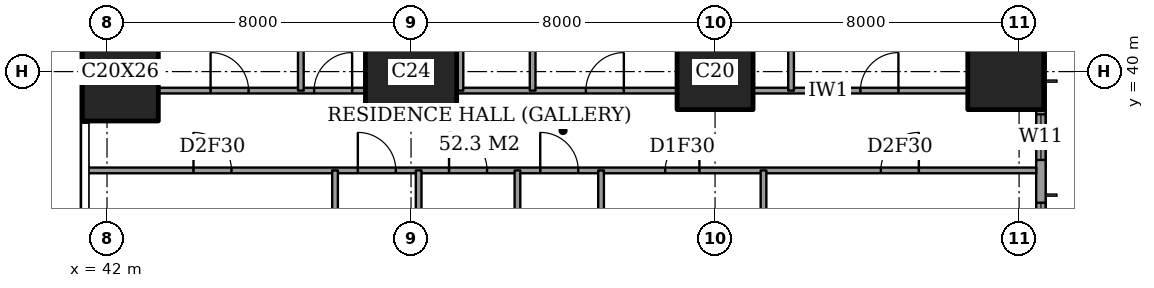
"""IFC4 building model, lengths in metres.
Left out: names, types, materials, properties, quantities, classifications, styles, units other than length and angle.
Written with IfcOpenShell. Run it as: python <this file> out.ifc"""

import sys

from ifc_helpers import new_model, si_unit, direction, frame, frame_2d, origin, origin_2d, place, context, subcontext, project, spatial, rectangle, extrude, element, fill, save


model = new_model("IFC4")
c1 = context("Model", 3, precision=1e-05, world=origin(), true_north=direction((0.0, 1.0)))
c2 = subcontext(c1, "Body", "Model", "MODEL_VIEW")
j1 = project(units=[si_unit("LENGTHUNIT", "METRE"), si_unit("PLANEANGLEUNIT", "RADIAN")], contexts=[c1])
p1 = place(None, origin())
s1 = spatial("IfcSite", under=j1, at=p1, CompositionType="ELEMENT")
p2 = place(p1, origin())
s2 = spatial("IfcBuilding", under=s1, at=p2, CompositionType="ELEMENT")
p3 = place(p2, frame((0.0, 0.0, 117.8)))
s3 = spatial("IfcBuildingStorey", under=s2, at=p3, CompositionType="ELEMENT", Elevation=117.8)
p4 = place(p3, frame((42.35, 40.0, 0.0), z_axis=(0.0, 0.0, 1.0), x_axis=(1.0, 0.0, 0.0)))
e1 = element("IfcColumn", 1, at=p4, inside=s3, PredefinedType="COLUMN", context=c2, shape_type="SweptSolid", body=[
    extrude(rectangle(XDim=2.0, YDim=2.6, at=origin_2d()), origin(), (0.0, 0.0, 1.0), 3.6),
])
p5 = place(p3, frame((50.0, 40.0, 0.0), z_axis=(0.0, 0.0, 1.0), x_axis=(1.0, 0.0, 0.0)))
e2 = element("IfcColumn", 2, at=p5, inside=s3, PredefinedType="COLUMN", context=c2, shape_type="SweptSolid", body=[
    extrude(rectangle(XDim=2.4, YDim=2.4, at=origin_2d()), origin(), (0.0, 0.0, 1.0), 3.6),
])
for number, where, z_axis, x_axis in (
    (3, (58.0, 40.0, 0.0), (0.0, 0.0, 1.0), (1.0, 0.0, 0.0)),
    (4, (65.65, 40.0, 0.0), (0.0, 0.0, 1.0), (1.0, 0.0, 0.0)),
):
    element("IfcColumn", number, at=place(p3, frame(where, z_axis=z_axis, x_axis=x_axis)), inside=s3, PredefinedType="COLUMN", context=c2, shape_type="SweptSolid", body=[
        extrude(rectangle(XDim=2.0, YDim=2.0, at=origin_2d()), origin(), (0.0, 0.0, 1.0), 3.6),
    ])
p6 = place(p3, frame((66.575, 3.175, 0.0), z_axis=(0.0, 0.0, 1.0), x_axis=(0.0, 1.0, 0.0)))
e5 = element("IfcWall", 5, at=p6, inside=s3, PredefinedType="SOLIDWALL", context=c2, shape_type="SweptSolid", body=[
    extrude(rectangle(XDim=41.65, YDim=0.25, at=frame_2d((20.825, 0.0))), origin(), (0.0, 0.0, 1.0), 3.6),
])
p7 = place(p6, frame((0.775, 0.0, 0.4)))
e6 = element("IfcOpeningElement", 6, at=p7, cuts=e5, PredefinedType="OPENING", context=c2, shape_type="SweptSolid", body=[
    extrude(rectangle(XDim=2.4, YDim=2.2, at=frame_2d((1.2, 1.1))), frame((0.0, 0.135, 0.0), z_axis=(0.0, -1.0, 0.0), x_axis=(1.0, 0.0, 0.0)), (0.0, 0.0, 1.0), 0.27),
])
p8 = place(p6, frame((6.4, 0.0, 0.4)))
e7 = element("IfcOpeningElement", 7, at=p8, cuts=e5, PredefinedType="OPENING", context=c2, shape_type="SweptSolid", body=[
    extrude(rectangle(XDim=1.2, YDim=2.2, at=frame_2d((0.6, 1.1))), frame((0.0, 0.135, 0.0), z_axis=(0.0, -1.0, 0.0), x_axis=(1.0, 0.0, 0.0)), (0.0, 0.0, 1.0), 0.27),
])
p9 = place(p6, frame((8.475, 0.0, 0.4)))
e8 = element("IfcOpeningElement", 8, at=p9, cuts=e5, PredefinedType="OPENING", context=c2, shape_type="SweptSolid", body=[
    extrude(rectangle(XDim=2.4, YDim=2.2, at=frame_2d((1.2, 1.1))), frame((0.0, 0.135, 0.0), z_axis=(0.0, -1.0, 0.0), x_axis=(1.0, 0.0, 0.0)), (0.0, 0.0, 1.0), 0.27),
])
p10 = place(p6, frame((15.775, 0.0, 0.4)))
e9 = element("IfcOpeningElement", 9, at=p10, cuts=e5, PredefinedType="OPENING", context=c2, shape_type="SweptSolid", body=[
    extrude(rectangle(XDim=2.4, YDim=2.2, at=frame_2d((1.2, 1.1))), frame((0.0, 0.135, 0.0), z_axis=(0.0, -1.0, 0.0), x_axis=(1.0, 0.0, 0.0)), (0.0, 0.0, 1.0), 0.27),
])
p11 = place(p6, frame((23.475, 0.0, 0.4)))
e10 = element("IfcOpeningElement", 10, at=p11, cuts=e5, PredefinedType="OPENING", context=c2, shape_type="SweptSolid", body=[
    extrude(rectangle(XDim=2.4, YDim=2.2, at=frame_2d((1.2, 1.1))), frame((0.0, 0.135, 0.0), z_axis=(0.0, -1.0, 0.0), x_axis=(1.0, 0.0, 0.0)), (0.0, 0.0, 1.0), 0.27),
])
p12 = place(p6, frame((30.975, 0.0, 0.4)))
e11 = element("IfcOpeningElement", 11, at=p12, cuts=e5, PredefinedType="OPENING", context=c2, shape_type="SweptSolid", body=[
    extrude(rectangle(XDim=2.4, YDim=2.2, at=frame_2d((1.2, 1.1))), frame((0.0, 0.135, 0.0), z_axis=(0.0, -1.0, 0.0), x_axis=(1.0, 0.0, 0.0)), (0.0, 0.0, 1.0), 0.27),
])
p13 = place(p6, frame((34.5, 0.0, 0.4)))
e12 = element("IfcOpeningElement", 12, at=p13, cuts=e5, PredefinedType="OPENING", context=c2, shape_type="SweptSolid", body=[
    extrude(rectangle(XDim=1.2, YDim=2.2, at=frame_2d((0.6, 1.1))), frame((0.0, 0.135, 0.0), z_axis=(0.0, -1.0, 0.0), x_axis=(1.0, 0.0, 0.0)), (0.0, 0.0, 1.0), 0.27),
])
p14 = place(p6, frame((38.475, 0.0, 0.4)))
e13 = element("IfcOpeningElement", 13, at=p14, cuts=e5, PredefinedType="OPENING", context=c2, shape_type="SweptSolid", body=[
    extrude(rectangle(XDim=2.4, YDim=2.2, at=frame_2d((1.2, 1.1))), frame((0.0, 0.135, 0.0), z_axis=(0.0, -1.0, 0.0), x_axis=(1.0, 0.0, 0.0)), (0.0, 0.0, 1.0), 0.27),
])
p15 = place(p3, frame((41.439, 37.4, 0.0), z_axis=(0.0, 0.0, 1.0), x_axis=(1.0, 0.0, 0.0)))
e14 = element("IfcWall", 14, at=p15, inside=s3, PredefinedType="PARTITIONING", context=c2, shape_type="SweptSolid", body=[
    extrude(rectangle(XDim=25.011, YDim=0.15, at=frame_2d((12.505, 0.0))), origin(), (0.0, 0.0, 1.0), 3.35),
])
p16 = place(p15, frame((11.961, 0.0, 0.0)))
e15 = element("IfcOpeningElement", 15, at=p16, cuts=e14, PredefinedType="OPENING", context=c2, shape_type="SweptSolid", body=[
    extrude(rectangle(XDim=1.0, YDim=2.1, at=frame_2d((0.5, 1.05))), frame((0.0, 0.085, 0.0), z_axis=(0.0, -1.0, 0.0), x_axis=(1.0, 0.0, 0.0)), (0.0, 0.0, 1.0), 0.17),
])
p17 = place(p15, frame((20.924, 0.0, 0.0)))
e16 = element("IfcOpeningElement", 16, at=p17, cuts=e14, PredefinedType="OPENING", context=c2, shape_type="SweptSolid", body=[
    extrude(rectangle(XDim=1.0, YDim=2.1, at=frame_2d((0.5, 1.05))), frame((0.0, 0.085, 0.0), z_axis=(0.0, -1.0, 0.0), x_axis=(1.0, 0.0, 0.0)), (0.0, 0.0, 1.0), 0.17),
])
p18 = place(p15, frame((15.249, 0.0, 0.0)))
e17 = element("IfcOpeningElement", 17, at=p18, cuts=e14, PredefinedType="OPENING", context=c2, shape_type="SweptSolid", body=[
    extrude(rectangle(XDim=0.9, YDim=2.1, at=frame_2d((0.45, 1.05))), frame((0.0, 0.085, 0.0), z_axis=(0.0, -1.0, 0.0), x_axis=(1.0, 0.0, 0.0)), (0.0, 0.0, 1.0), 0.17),
])
p19 = place(p15, frame((9.561, 0.0, 0.0)))
e18 = element("IfcOpeningElement", 18, at=p19, cuts=e14, PredefinedType="OPENING", context=c2, shape_type="SweptSolid", body=[
    extrude(rectangle(XDim=1.0, YDim=2.1, at=frame_2d((0.5, 1.05))), frame((0.0, 0.085, 0.0), z_axis=(0.0, -1.0, 0.0), x_axis=(1.0, 0.0, 0.0)), (0.0, 0.0, 1.0), 0.17),
])
p20 = place(p15, frame((7.161, 0.0, 0.0)))
e19 = element("IfcOpeningElement", 19, at=p20, cuts=e14, PredefinedType="OPENING", context=c2, shape_type="SweptSolid", body=[
    extrude(rectangle(XDim=1.0, YDim=2.1, at=frame_2d((0.5, 1.05))), frame((0.0, 0.085, 0.0), z_axis=(0.0, -1.0, 0.0), x_axis=(1.0, 0.0, 0.0)), (0.0, 0.0, 1.0), 0.17),
])
p21 = place(p15, frame((2.836, 0.0, 0.0)))
e20 = element("IfcOpeningElement", 20, at=p21, cuts=e14, PredefinedType="OPENING", context=c2, shape_type="SweptSolid", body=[
    extrude(rectangle(XDim=1.0, YDim=2.1, at=frame_2d((0.5, 1.05))), frame((0.0, 0.085, 0.0), z_axis=(0.0, -1.0, 0.0), x_axis=(1.0, 0.0, 0.0)), (0.0, 0.0, 1.0), 0.17),
])
p22 = place(p3, frame((43.35, 39.5, 0.0), z_axis=(0.0, 0.0, 1.0), x_axis=(1.0, 0.0, 0.0)))
e21 = element("IfcWall", 21, at=p22, inside=s3, PredefinedType="PARTITIONING", context=c2, shape_type="SweptSolid", body=[
    extrude(rectangle(XDim=5.45, YDim=0.15, at=frame_2d((2.725, 0.0))), origin(), (0.0, 0.0, 1.0), 3.35),
])
p23 = place(p22, frame((4.1, 0.0, 0.0)))
e22 = element("IfcOpeningElement", 22, at=p23, cuts=e21, PredefinedType="OPENING", context=c2, shape_type="SweptSolid", body=[
    extrude(rectangle(XDim=1.0, YDim=2.1, at=frame_2d((0.5, 1.05))), frame((0.0, 0.085, 0.0), z_axis=(0.0, -1.0, 0.0), x_axis=(1.0, 0.0, 0.0)), (0.0, 0.0, 1.0), 0.17),
])
p24 = place(p22, frame((1.375, 0.0, 0.0)))
e23 = element("IfcOpeningElement", 23, at=p24, cuts=e21, PredefinedType="OPENING", context=c2, shape_type="SweptSolid", body=[
    extrude(rectangle(XDim=1.0, YDim=2.1, at=frame_2d((0.5, 1.05))), frame((0.0, 0.085, 0.0), z_axis=(0.0, -1.0, 0.0), x_axis=(1.0, 0.0, 0.0)), (0.0, 0.0, 1.0), 0.17),
])
p25 = place(p3, frame((51.2, 39.5, 0.0), z_axis=(0.0, 0.0, 1.0), x_axis=(1.0, 0.0, 0.0)))
e24 = element("IfcWall", 24, at=p25, inside=s3, PredefinedType="PARTITIONING", context=c2, shape_type="SweptSolid", body=[
    extrude(rectangle(XDim=5.8, YDim=0.15, at=frame_2d((2.9, 0.0))), origin(), (0.0, 0.0, 1.0), 3.35),
])
p26 = place(p25, frame((3.4, 0.0, 0.0)))
e25 = element("IfcOpeningElement", 25, at=p26, cuts=e24, PredefinedType="OPENING", context=c2, shape_type="SweptSolid", body=[
    extrude(rectangle(XDim=1.0, YDim=2.1, at=frame_2d((0.5, 1.05))), frame((0.0, 0.085, 0.0), z_axis=(0.0, -1.0, 0.0), x_axis=(1.0, 0.0, 0.0)), (0.0, 0.0, 1.0), 0.17),
])
p27 = place(p3, frame((59.0, 39.5, 0.0), z_axis=(0.0, 0.0, 1.0), x_axis=(1.0, 0.0, 0.0)))
e26 = element("IfcWall", 26, at=p27, inside=s3, PredefinedType="PARTITIONING", context=c2, shape_type="SweptSolid", body=[
    extrude(rectangle(XDim=5.65, YDim=0.15, at=frame_2d((2.825, 0.0))), origin(), (0.0, 0.0, 1.0), 3.35),
])
p28 = place(p27, frame((2.825, 0.0, 0.0)))
e27 = element("IfcOpeningElement", 27, at=p28, cuts=e26, PredefinedType="OPENING", context=c2, shape_type="SweptSolid", body=[
    extrude(rectangle(XDim=1.0, YDim=2.1, at=frame_2d((0.5, 1.05))), frame((0.0, 0.085, 0.0), z_axis=(0.0, -1.0, 0.0), x_axis=(1.0, 0.0, 0.0)), (0.0, 0.0, 1.0), 0.17),
])
p29 = place(p3, frame((47.1, 39.5, 0.0), z_axis=(0.0, 0.0, 1.0), x_axis=(0.0, 1.0, 0.0)))
e28 = element("IfcWall", 28, at=p29, inside=s3, PredefinedType="PARTITIONING", context=c2, shape_type="SweptSolid", body=[
    extrude(rectangle(XDim=8.95, YDim=0.15, at=frame_2d((4.475, 0.0))), origin(), (0.0, 0.0, 1.0), 3.35),
])
p30 = place(p3, frame((48.0, 28.0, 0.0), z_axis=(0.0, 0.0, 1.0), x_axis=(0.0, 1.0, 0.0)))
e29 = element("IfcWall", 29, at=p30, inside=s3, PredefinedType="PARTITIONING", context=c2, shape_type="SweptSolid", body=[
    extrude(rectangle(XDim=9.4, YDim=0.15, at=frame_2d((4.7, 0.0))), origin(), (0.0, 0.0, 1.0), 3.35),
])
p31 = place(p30, frame((0.5, 0.0, 0.0)))
e30 = element("IfcOpeningElement", 30, at=p31, cuts=e29, PredefinedType="OPENING", context=c2, shape_type="SweptSolid", body=[
    extrude(rectangle(XDim=1.0, YDim=2.1, at=frame_2d((0.5, 1.05))), frame((0.0, 0.085, 0.0), z_axis=(0.0, -1.0, 0.0), x_axis=(1.0, 0.0, 0.0)), (0.0, 0.0, 1.0), 0.17),
])
p32 = place(p3, frame((50.2, 33.2, 0.0), z_axis=(0.0, 0.0, 1.0), x_axis=(0.0, 1.0, 0.0)))
e31 = element("IfcWall", 31, at=p32, inside=s3, PredefinedType="PARTITIONING", context=c2, shape_type="SweptSolid", body=[
    extrude(rectangle(XDim=4.2, YDim=0.15, at=frame_2d((2.1, 0.0))), origin(), (0.0, 0.0, 1.0), 3.35),
])
p33 = place(p3, frame((51.3, 39.5, 0.0), z_axis=(0.0, 0.0, 1.0), x_axis=(0.0, 1.0, 0.0)))
e32 = element("IfcWall", 32, at=p33, inside=s3, PredefinedType="PARTITIONING", context=c2, shape_type="SweptSolid", body=[
    extrude(rectangle(XDim=8.95, YDim=0.15, at=frame_2d((4.475, 0.0))), origin(), (0.0, 0.0, 1.0), 3.35),
])
p34 = place(p33, frame((4.025, 0.0, 0.0)))
e33 = element("IfcOpeningElement", 33, at=p34, cuts=e32, PredefinedType="OPENING", context=c2, shape_type="SweptSolid", body=[
    extrude(rectangle(XDim=0.9, YDim=2.1, at=frame_2d((0.45, 1.05))), frame((0.0, 0.085, 0.0), z_axis=(0.0, -1.0, 0.0), x_axis=(1.0, 0.0, 0.0)), (0.0, 0.0, 1.0), 0.17),
])
p35 = place(p3, frame((52.8, 30.0, 0.0), z_axis=(0.0, 0.0, 1.0), x_axis=(0.0, 1.0, 0.0)))
e34 = element("IfcWall", 34, at=p35, inside=s3, PredefinedType="PARTITIONING", context=c2, shape_type="SweptSolid", body=[
    extrude(rectangle(XDim=7.4, YDim=0.15, at=frame_2d((3.7, 0.0))), origin(), (0.0, 0.0, 1.0), 3.35),
])
p36 = place(p3, frame((53.2, 39.5, 0.0), z_axis=(0.0, 0.0, 1.0), x_axis=(0.0, 1.0, 0.0)))
e35 = element("IfcWall", 35, at=p36, inside=s3, PredefinedType="PARTITIONING", context=c2, shape_type="SweptSolid", body=[
    extrude(rectangle(XDim=8.95, YDim=0.15, at=frame_2d((4.475, 0.0))), origin(), (0.0, 0.0, 1.0), 3.35),
])
p37 = place(p3, frame((55.0, 28.0, 0.0), z_axis=(0.0, 0.0, 1.0), x_axis=(0.0, 1.0, 0.0)))
e36 = element("IfcWall", 36, at=p37, inside=s3, PredefinedType="PARTITIONING", context=c2, shape_type="SweptSolid", body=[
    extrude(rectangle(XDim=9.4, YDim=0.15, at=frame_2d((4.7, 0.0))), origin(), (0.0, 0.0, 1.0), 3.35),
])
p38 = place(p37, frame((0.5, 0.0, 0.0)))
e37 = element("IfcOpeningElement", 37, at=p38, cuts=e36, PredefinedType="OPENING", context=c2, shape_type="SweptSolid", body=[
    extrude(rectangle(XDim=1.0, YDim=2.1, at=frame_2d((0.5, 1.05))), frame((0.0, 0.085, 0.0), z_axis=(0.0, -1.0, 0.0), x_axis=(1.0, 0.0, 0.0)), (0.0, 0.0, 1.0), 0.17),
])
p39 = place(p3, frame((59.275, 33.2, 0.0), z_axis=(0.0, 0.0, 1.0), x_axis=(0.0, 1.0, 0.0)))
e38 = element("IfcWall", 38, at=p39, inside=s3, PredefinedType="PARTITIONING", context=c2, shape_type="SweptSolid", body=[
    extrude(rectangle(XDim=4.2, YDim=0.15, at=frame_2d((2.1, 0.0))), origin(), (0.0, 0.0, 1.0), 3.35),
])
p40 = place(p3, frame((60.0, 39.5, 0.0), z_axis=(0.0, 0.0, 1.0), x_axis=(0.0, 1.0, 0.0)))
e39 = element("IfcWall", 39, at=p40, inside=s3, PredefinedType="PARTITIONING", context=c2, shape_type="SweptSolid", body=[
    extrude(rectangle(XDim=8.95, YDim=0.15, at=frame_2d((4.475, 0.0))), origin(), (0.0, 0.0, 1.0), 3.35),
])
p41 = place(p12, origin())
e40 = element("IfcWindow", 40, at=p41, inside=s3, PartitioningType="SINGLE_PANEL", PredefinedType="WINDOW", context=c2, shape_type="SweptSolid", body=[
    extrude(rectangle(XDim=2.4, YDim=2.2, at=frame_2d((1.2, 1.1))), frame((0.0, 0.03, 0.0), z_axis=(0.0, -1.0, 0.0), x_axis=(1.0, 0.0, 0.0)), (0.0, 0.0, 1.0), 0.06),
])
fill(e11, e40)
p42 = place(p13, origin())
e41 = element("IfcWindow", 41, at=p42, inside=s3, PartitioningType="SINGLE_PANEL", PredefinedType="WINDOW", context=c2, shape_type="SweptSolid", body=[
    extrude(rectangle(XDim=1.2, YDim=2.2, at=frame_2d((0.6, 1.1))), frame((0.0, 0.03, 0.0), z_axis=(0.0, -1.0, 0.0), x_axis=(1.0, 0.0, 0.0)), (0.0, 0.0, 1.0), 0.06),
])
fill(e12, e41)
p43 = place(p28, origin())
e42 = element("IfcDoor", 42, at=p43, inside=s3, OperationType="SINGLE_SWING_LEFT", PredefinedType="DOOR", context=c2, shape_type="SweptSolid", body=[
    extrude(rectangle(XDim=1.0, YDim=2.1, at=frame_2d((0.5, 1.05))), frame((0.0, 0.025, 0.0), z_axis=(0.0, -1.0, 0.0), x_axis=(1.0, 0.0, 0.0)), (0.0, 0.0, 1.0), 0.05),
])
fill(e27, e42)
p44 = place(p26, origin())
e43 = element("IfcDoor", 43, at=p44, inside=s3, OperationType="SINGLE_SWING_LEFT", PredefinedType="DOOR", context=c2, shape_type="SweptSolid", body=[
    extrude(rectangle(XDim=1.0, YDim=2.1, at=frame_2d((0.5, 1.05))), frame((0.0, 0.025, 0.0), z_axis=(0.0, -1.0, 0.0), x_axis=(1.0, 0.0, 0.0)), (0.0, 0.0, 1.0), 0.05),
])
fill(e25, e43)
p45 = place(p23, origin())
e44 = element("IfcDoor", 44, at=p45, inside=s3, OperationType="SINGLE_SWING_LEFT", PredefinedType="DOOR", context=c2, shape_type="SweptSolid", body=[
    extrude(rectangle(XDim=1.0, YDim=2.1, at=frame_2d((0.5, 1.05))), frame((0.0, 0.025, 0.0), z_axis=(0.0, -1.0, 0.0), x_axis=(1.0, 0.0, 0.0)), (0.0, 0.0, 1.0), 0.05),
])
fill(e22, e44)
p46 = place(p24, origin())
e45 = element("IfcDoor", 45, at=p46, inside=s3, OperationType="SINGLE_SWING_RIGHT", PredefinedType="DOOR", context=c2, shape_type="SweptSolid", body=[
    extrude(rectangle(XDim=1.0, YDim=2.1, at=frame_2d((0.5, 1.05))), frame((0.0, 0.025, 0.0), z_axis=(0.0, -1.0, 0.0), x_axis=(1.0, 0.0, 0.0)), (0.0, 0.0, 1.0), 0.05),
])
fill(e23, e45)
p47 = place(p16, origin())
e46 = element("IfcDoor", 46, at=p47, inside=s3, OperationType="SINGLE_SWING_RIGHT", PredefinedType="DOOR", context=c2, shape_type="SweptSolid", body=[
    extrude(rectangle(XDim=1.0, YDim=2.1, at=frame_2d((0.5, 1.05))), frame((0.0, 0.025, 0.0), z_axis=(0.0, -1.0, 0.0), x_axis=(1.0, 0.0, 0.0)), (0.0, 0.0, 1.0), 0.05),
])
fill(e15, e46)
p48 = place(p17, origin())
e47 = element("IfcDoor", 47, at=p48, inside=s3, OperationType="SINGLE_SWING_LEFT", PredefinedType="DOOR", context=c2, shape_type="SweptSolid", body=[
    extrude(rectangle(XDim=1.0, YDim=2.1, at=frame_2d((0.5, 1.05))), frame((0.0, 0.025, 0.0), z_axis=(0.0, -1.0, 0.0), x_axis=(1.0, 0.0, 0.0)), (0.0, 0.0, 1.0), 0.05),
])
fill(e16, e47)
p49 = place(p18, origin())
e48 = element("IfcDoor", 48, at=p49, inside=s3, OperationType="SINGLE_SWING_LEFT", PredefinedType="DOOR", context=c2, shape_type="SweptSolid", body=[
    extrude(rectangle(XDim=0.9, YDim=2.1, at=frame_2d((0.45, 1.05))), frame((0.0, 0.025, 0.0), z_axis=(0.0, -1.0, 0.0), x_axis=(1.0, 0.0, 0.0)), (0.0, 0.0, 1.0), 0.05),
])
fill(e17, e48)
p50 = place(p19, origin())
e49 = element("IfcDoor", 49, at=p50, inside=s3, OperationType="SINGLE_SWING_RIGHT", PredefinedType="DOOR", context=c2, shape_type="SweptSolid", body=[
    extrude(rectangle(XDim=1.0, YDim=2.1, at=frame_2d((0.5, 1.05))), frame((0.0, 0.025, 0.0), z_axis=(0.0, -1.0, 0.0), x_axis=(1.0, 0.0, 0.0)), (0.0, 0.0, 1.0), 0.05),
])
fill(e18, e49)
p51 = place(p20, origin())
e50 = element("IfcDoor", 50, at=p51, inside=s3, OperationType="SINGLE_SWING_RIGHT", PredefinedType="DOOR", context=c2, shape_type="SweptSolid", body=[
    extrude(rectangle(XDim=1.0, YDim=2.1, at=frame_2d((0.5, 1.05))), frame((0.0, 0.025, 0.0), z_axis=(0.0, -1.0, 0.0), x_axis=(1.0, 0.0, 0.0)), (0.0, 0.0, 1.0), 0.05),
])
fill(e19, e50)
p52 = place(p21, origin())
e51 = element("IfcDoor", 51, at=p52, inside=s3, OperationType="SINGLE_SWING_RIGHT", PredefinedType="DOOR", context=c2, shape_type="SweptSolid", body=[
    extrude(rectangle(XDim=1.0, YDim=2.1, at=frame_2d((0.5, 1.05))), frame((0.0, 0.025, 0.0), z_axis=(0.0, -1.0, 0.0), x_axis=(1.0, 0.0, 0.0)), (0.0, 0.0, 1.0), 0.05),
])
fill(e20, e51)
save(model, sys.argv[1])
